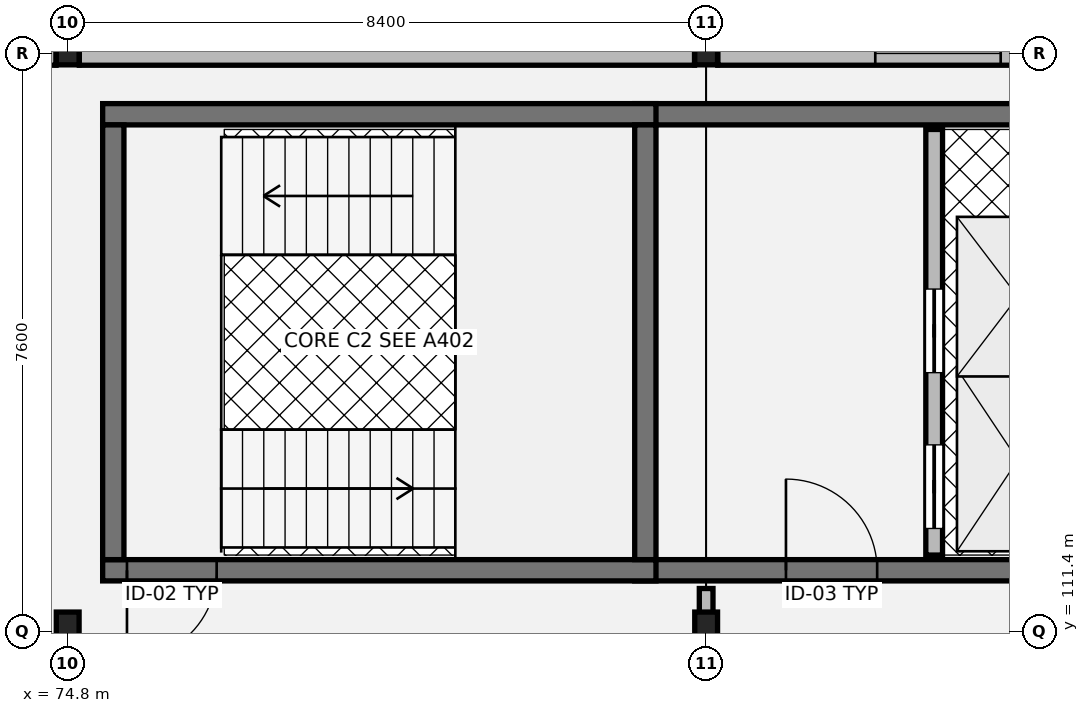
"""IFC4 building model, lengths in metres.
Left out: names, types, materials, properties, quantities, classifications, styles, units other than length and angle.
Written with IfcOpenShell. Run it as: python <this file> out.ifc"""

import sys

from ifc_helpers import new_model, si_unit, direction, frame, frame_2d, origin, origin_2d, place, context, subcontext, project, spatial, rectangle, hollow_rectangle, i_section, extrude, element, fill, save


model = new_model("IFC4")
c1 = context("Model", 3, precision=1e-05, world=origin(), true_north=direction((0.0, 1.0)))
c2 = subcontext(c1, "Body", "Model", "MODEL_VIEW")
j1 = project(units=[si_unit("LENGTHUNIT", "METRE"), si_unit("PLANEANGLEUNIT", "RADIAN")], contexts=[c1])
p1 = place(None, origin())
s1 = spatial("IfcSite", under=j1, at=p1, CompositionType="ELEMENT")
p2 = place(p1, origin())
s2 = spatial("IfcBuilding", under=s1, at=p2, CompositionType="ELEMENT")
p3 = place(p2, frame((0.0, 0.0, 5.1)))
s3 = spatial("IfcBuildingStorey", under=s2, at=p3, CompositionType="ELEMENT", Elevation=5.1)
p4 = place(p3, frame((74.8, 111.4, 0.0), z_axis=(0.0, 0.0, 1.0), x_axis=(1.0, 0.0, 0.0)))
e1 = element("IfcColumn", 1, at=p4, inside=s3, PredefinedType="COLUMN", context=c2, shape_type="SweptSolid", body=[
    extrude(i_section(OverallWidth=0.3, OverallDepth=0.5, WebThickness=0.014, FlangeThickness=0.028, at=origin_2d()), origin(), (0.0, 0.0, 1.0), 4.055),
])
p5 = place(p3, frame((74.8, 119.0, 0.0), z_axis=(0.0, 0.0, 1.0), x_axis=(1.0, 0.0, 0.0)))
e2 = element("IfcColumn", 2, at=p5, inside=s3, PredefinedType="COLUMN", context=c2, shape_type="SweptSolid", body=[
    extrude(hollow_rectangle(XDim=0.3, YDim=0.3, WallThickness=0.012, at=origin_2d()), origin(), (0.0, 0.0, 1.0), 4.055),
])
p6 = place(p3, frame((83.2, 111.4, 0.0), z_axis=(0.0, 0.0, 1.0), x_axis=(1.0, 0.0, 0.0)))
e3 = element("IfcColumn", 3, at=p6, inside=s3, PredefinedType="COLUMN", context=c2, shape_type="SweptSolid", body=[
    extrude(i_section(OverallWidth=0.3, OverallDepth=0.5, WebThickness=0.014, FlangeThickness=0.028, at=origin_2d()), origin(), (0.0, 0.0, 1.0), 4.055),
])
p7 = place(p3, frame((83.2, 119.0, 0.0), z_axis=(0.0, 0.0, 1.0), x_axis=(1.0, 0.0, 0.0)))
e4 = element("IfcColumn", 4, at=p7, inside=s3, PredefinedType="COLUMN", context=c2, shape_type="SweptSolid", body=[
    extrude(hollow_rectangle(XDim=0.3, YDim=0.3, WallThickness=0.012, at=origin_2d()), origin(), (0.0, 0.0, 1.0), 4.055),
])
p8 = place(p3, frame((91.447, 119.0, 0.0), z_axis=(0.0, 0.0, 1.0), x_axis=(-1.0, 0.0, 0.0)))
e5 = element("IfcWall", 5, at=p8, inside=s3, PredefinedType="SOLIDWALL", context=c2, shape_type="SweptSolid", body=[
    extrude(rectangle(XDim=8.094, YDim=0.31, at=frame_2d((4.047, 0.0))), origin(), (0.0, 0.0, 1.0), 3.48),
])
p9 = place(p8, frame((2.072, 0.0, 0.8)))
e6 = element("IfcOpeningElement", 6, at=p9, cuts=e5, PredefinedType="OPENING", context=c2, shape_type="SweptSolid", body=[
    extrude(rectangle(XDim=1.65, YDim=2.25, at=frame_2d((0.825, 1.125))), frame((0.0, 0.165, 0.0), z_axis=(0.0, -1.0, 0.0), x_axis=(1.0, 0.0, 0.0)), (0.0, 0.0, 1.0), 0.33),
])
p10 = place(p8, frame((4.372, 0.0, 0.8)))
e7 = element("IfcOpeningElement", 7, at=p10, cuts=e5, PredefinedType="OPENING", context=c2, shape_type="SweptSolid", body=[
    extrude(rectangle(XDim=1.65, YDim=2.25, at=frame_2d((0.825, 1.125))), frame((0.0, 0.165, 0.0), z_axis=(0.0, -1.0, 0.0), x_axis=(1.0, 0.0, 0.0)), (0.0, 0.0, 1.0), 0.33),
])
p11 = place(p3, frame((83.047, 119.0, 0.0), z_axis=(0.0, 0.0, 1.0), x_axis=(-1.0, 0.0, 0.0)))
e8 = element("IfcWall", 8, at=p11, inside=s3, PredefinedType="SOLIDWALL", context=c2, shape_type="SweptSolid", body=[
    extrude(rectangle(XDim=8.094, YDim=0.31, at=frame_2d((4.047, 0.0))), origin(), (0.0, 0.0, 1.0), 3.48),
])
p12 = place(p3, frame((74.647, 119.0, 0.0), z_axis=(0.0, 0.0, 1.0), x_axis=(-1.0, 0.0, 0.0)))
e9 = element("IfcWall", 9, at=p12, inside=s3, PredefinedType="SOLIDWALL", context=c2, shape_type="SweptSolid", body=[
    extrude(rectangle(XDim=8.094, YDim=0.31, at=frame_2d((4.047, 0.0))), origin(), (0.0, 0.0, 1.0), 3.48),
])
p13 = place(p12, frame((2.272, 0.0, 0.8)))
e10 = element("IfcOpeningElement", 10, at=p13, cuts=e9, PredefinedType="OPENING", context=c2, shape_type="SweptSolid", body=[
    extrude(rectangle(XDim=1.45, YDim=2.2, at=frame_2d((0.725, 1.1))), frame((0.0, 0.165, 0.0), z_axis=(0.0, -1.0, 0.0), x_axis=(1.0, 0.0, 0.0)), (0.0, 0.0, 1.0), 0.33),
])
p14 = place(p12, frame((4.372, 0.0, 0.8)))
e11 = element("IfcOpeningElement", 11, at=p14, cuts=e9, PredefinedType="OPENING", context=c2, shape_type="SweptSolid", body=[
    extrude(rectangle(XDim=1.45, YDim=2.2, at=frame_2d((0.725, 1.1))), frame((0.0, 0.165, 0.0), z_axis=(0.0, -1.0, 0.0), x_axis=(1.0, 0.0, 0.0)), (0.0, 0.0, 1.0), 0.33),
])
p15 = place(p3, frame((82.26, 112.2, 0.0), z_axis=(0.0, 0.0, 1.0), x_axis=(1.0, 0.0, 0.0)))
e12 = element("IfcWall", 12, at=p15, inside=s3, PredefinedType="SHEAR", context=c2, shape_type="SweptSolid", body=[
    extrude(rectangle(XDim=6.33, YDim=0.28, at=frame_2d((3.165, 0.0))), origin(), (0.0, 0.0, 1.0), 3.845),
])
p16 = place(p15, frame((1.99, 0.0, 0.0)))
e13 = element("IfcOpeningElement", 13, at=p16, cuts=e12, PredefinedType="OPENING", context=c2, shape_type="SweptSolid", body=[
    extrude(rectangle(XDim=1.2, YDim=2.16, at=frame_2d((0.6, 1.08))), frame((0.0, 0.15, 0.0), z_axis=(0.0, -1.0, 0.0), x_axis=(1.0, 0.0, 0.0)), (0.0, 0.0, 1.0), 0.3),
])
p17 = place(p3, frame((88.59, 118.2, 0.0), z_axis=(0.0, 0.0, 1.0), x_axis=(-1.0, 0.0, 0.0)))
e14 = element("IfcWall", 14, at=p17, inside=s3, PredefinedType="SHEAR", context=c2, shape_type="SweptSolid", body=[
    extrude(rectangle(XDim=6.33, YDim=0.28, at=frame_2d((3.165, 0.0))), origin(), (0.0, 0.0, 1.0), 3.845),
])
p18 = place(p3, frame((86.2, 112.4, 0.0), z_axis=(0.0, 0.0, 1.0), x_axis=(0.0, 1.0, 0.0)))
e15 = element("IfcWall", 15, at=p18, inside=s3, PredefinedType="SOLIDWALL", context=c2, shape_type="SweptSolid", body=[
    extrude(rectangle(XDim=5.6, YDim=0.22, at=frame_2d((2.8, 0.0))), origin(), (0.0, 0.0, 1.0), 3.845),
])
p19 = place(p18, frame((0.35, 0.0, 0.0)))
e16 = element("IfcOpeningElement", 16, at=p19, cuts=e15, PredefinedType="OPENING", context=c2, shape_type="SweptSolid", body=[
    extrude(rectangle(XDim=1.1, YDim=2.15, at=frame_2d((0.55, 1.075))), frame((0.0, 0.12, 0.0), z_axis=(0.0, -1.0, 0.0), x_axis=(1.0, 0.0, 0.0)), (0.0, 0.0, 1.0), 0.24),
])
p20 = place(p18, frame((2.4, 0.0, 0.0)))
e17 = element("IfcOpeningElement", 17, at=p20, cuts=e15, PredefinedType="OPENING", context=c2, shape_type="SweptSolid", body=[
    extrude(rectangle(XDim=1.1, YDim=2.15, at=frame_2d((0.55, 1.075))), frame((0.0, 0.12, 0.0), z_axis=(0.0, -1.0, 0.0), x_axis=(1.0, 0.0, 0.0)), (0.0, 0.0, 1.0), 0.24),
])
p21 = place(p3, frame((75.26, 112.2, 0.0), z_axis=(0.0, 0.0, 1.0), x_axis=(1.0, 0.0, 0.0)))
e18 = element("IfcWall", 18, at=p21, inside=s3, PredefinedType="SHEAR", context=c2, shape_type="SweptSolid", body=[
    extrude(rectangle(XDim=7.28, YDim=0.28, at=frame_2d((3.64, 0.0))), origin(), (0.0, 0.0, 1.0), 3.845),
])
p22 = place(p21, frame((0.32, 0.0, 0.0)))
e19 = element("IfcOpeningElement", 19, at=p22, cuts=e18, PredefinedType="OPENING", context=c2, shape_type="SweptSolid", body=[
    extrude(rectangle(XDim=1.18, YDim=2.18, at=frame_2d((0.59, 1.09))), frame((0.0, 0.15, 0.0), z_axis=(0.0, -1.0, 0.0), x_axis=(1.0, 0.0, 0.0)), (0.0, 0.0, 1.0), 0.3),
])
p23 = place(p3, frame((75.26, 118.2, 0.0), z_axis=(0.0, 0.0, 1.0), x_axis=(1.0, 0.0, 0.0)))
e20 = element("IfcWall", 20, at=p23, inside=s3, PredefinedType="SHEAR", context=c2, shape_type="SweptSolid", body=[
    extrude(rectangle(XDim=7.28, YDim=0.28, at=frame_2d((3.64, 0.0))), origin(), (0.0, 0.0, 1.0), 3.845),
])
for number, where, z_axis, x_axis in (
    (21, (75.4, 112.34, 0.0), (0.0, 0.0, 1.0), (0.0, 1.0, 0.0)),
    (22, (82.4, 112.34, 0.0), (0.0, 0.0, 1.0), (0.0, 1.0, 0.0)),
):
    element("IfcWall", number, at=place(p3, frame(where, z_axis=z_axis, x_axis=x_axis)), inside=s3, PredefinedType="SHEAR", context=c2, shape_type="SweptSolid", body=[
        extrude(rectangle(XDim=5.72, YDim=0.28, at=frame_2d((2.86, 0.0))), origin(), (0.0, 0.0, 1.0), 3.845),
    ])
p24 = place(p3, frame((83.2, 111.64, 0.0), z_axis=(0.0, 0.0, 1.0), x_axis=(0.0, 1.0, 0.0)))
e23 = element("IfcWall", 23, at=p24, inside=s3, PredefinedType="PARTITIONING", context=c2, shape_type="SweptSolid", body=[
    extrude(rectangle(XDim=0.32, YDim=0.18, at=frame_2d((0.16, 0.0))), origin(), (0.0, 0.0, 1.0), 3.18),
])
p25 = place(p10, origin())
e24 = element("IfcWindow", 24, at=p25, inside=s3, PartitioningType="SINGLE_PANEL", PredefinedType="WINDOW", context=c2, shape_type="SweptSolid", body=[
    extrude(rectangle(XDim=1.65, YDim=2.25, at=frame_2d((0.825, 1.125))), frame((0.0, 0.03, 0.0), z_axis=(0.0, -1.0, 0.0), x_axis=(1.0, 0.0, 0.0)), (0.0, 0.0, 1.0), 0.06),
])
fill(e7, e24)
p26 = place(p16, origin())
e25 = element("IfcDoor", 25, at=p26, inside=s3, OperationType="SINGLE_SWING_LEFT", PredefinedType="DOOR", context=c2, shape_type="SweptSolid", body=[
    extrude(rectangle(XDim=1.2, YDim=2.16, at=frame_2d((0.6, 1.08))), frame((0.0, 0.025, 0.0), z_axis=(0.0, -1.0, 0.0), x_axis=(1.0, 0.0, 0.0)), (0.0, 0.0, 1.0), 0.05),
])
fill(e13, e25)
p27 = place(p19, origin())
e26 = element("IfcDoor", 26, at=p27, inside=s3, OperationType="SLIDING_TO_LEFT", PredefinedType="DOOR", context=c2, shape_type="SweptSolid", body=[
    extrude(rectangle(XDim=1.1, YDim=2.15, at=frame_2d((0.55, 1.075))), frame((0.0, 0.025, 0.0), z_axis=(0.0, -1.0, 0.0), x_axis=(1.0, 0.0, 0.0)), (0.0, 0.0, 1.0), 0.05),
])
fill(e16, e26)
p28 = place(p20, origin())
e27 = element("IfcDoor", 27, at=p28, inside=s3, OperationType="SLIDING_TO_LEFT", PredefinedType="DOOR", context=c2, shape_type="SweptSolid", body=[
    extrude(rectangle(XDim=1.1, YDim=2.15, at=frame_2d((0.55, 1.075))), frame((0.0, 0.025, 0.0), z_axis=(0.0, -1.0, 0.0), x_axis=(1.0, 0.0, 0.0)), (0.0, 0.0, 1.0), 0.05),
])
fill(e17, e27)
p29 = place(p22, origin())
e28 = element("IfcDoor", 28, at=p29, inside=s3, OperationType="SINGLE_SWING_RIGHT", PredefinedType="DOOR", context=c2, shape_type="SweptSolid", body=[
    extrude(rectangle(XDim=1.18, YDim=2.18, at=frame_2d((0.59, 1.09))), frame((0.0, 0.025, 0.0), z_axis=(0.0, -1.0, 0.0), x_axis=(1.0, 0.0, 0.0)), (0.0, 0.0, 1.0), 0.05),
])
fill(e19, e28)
save(model, sys.argv[1])
